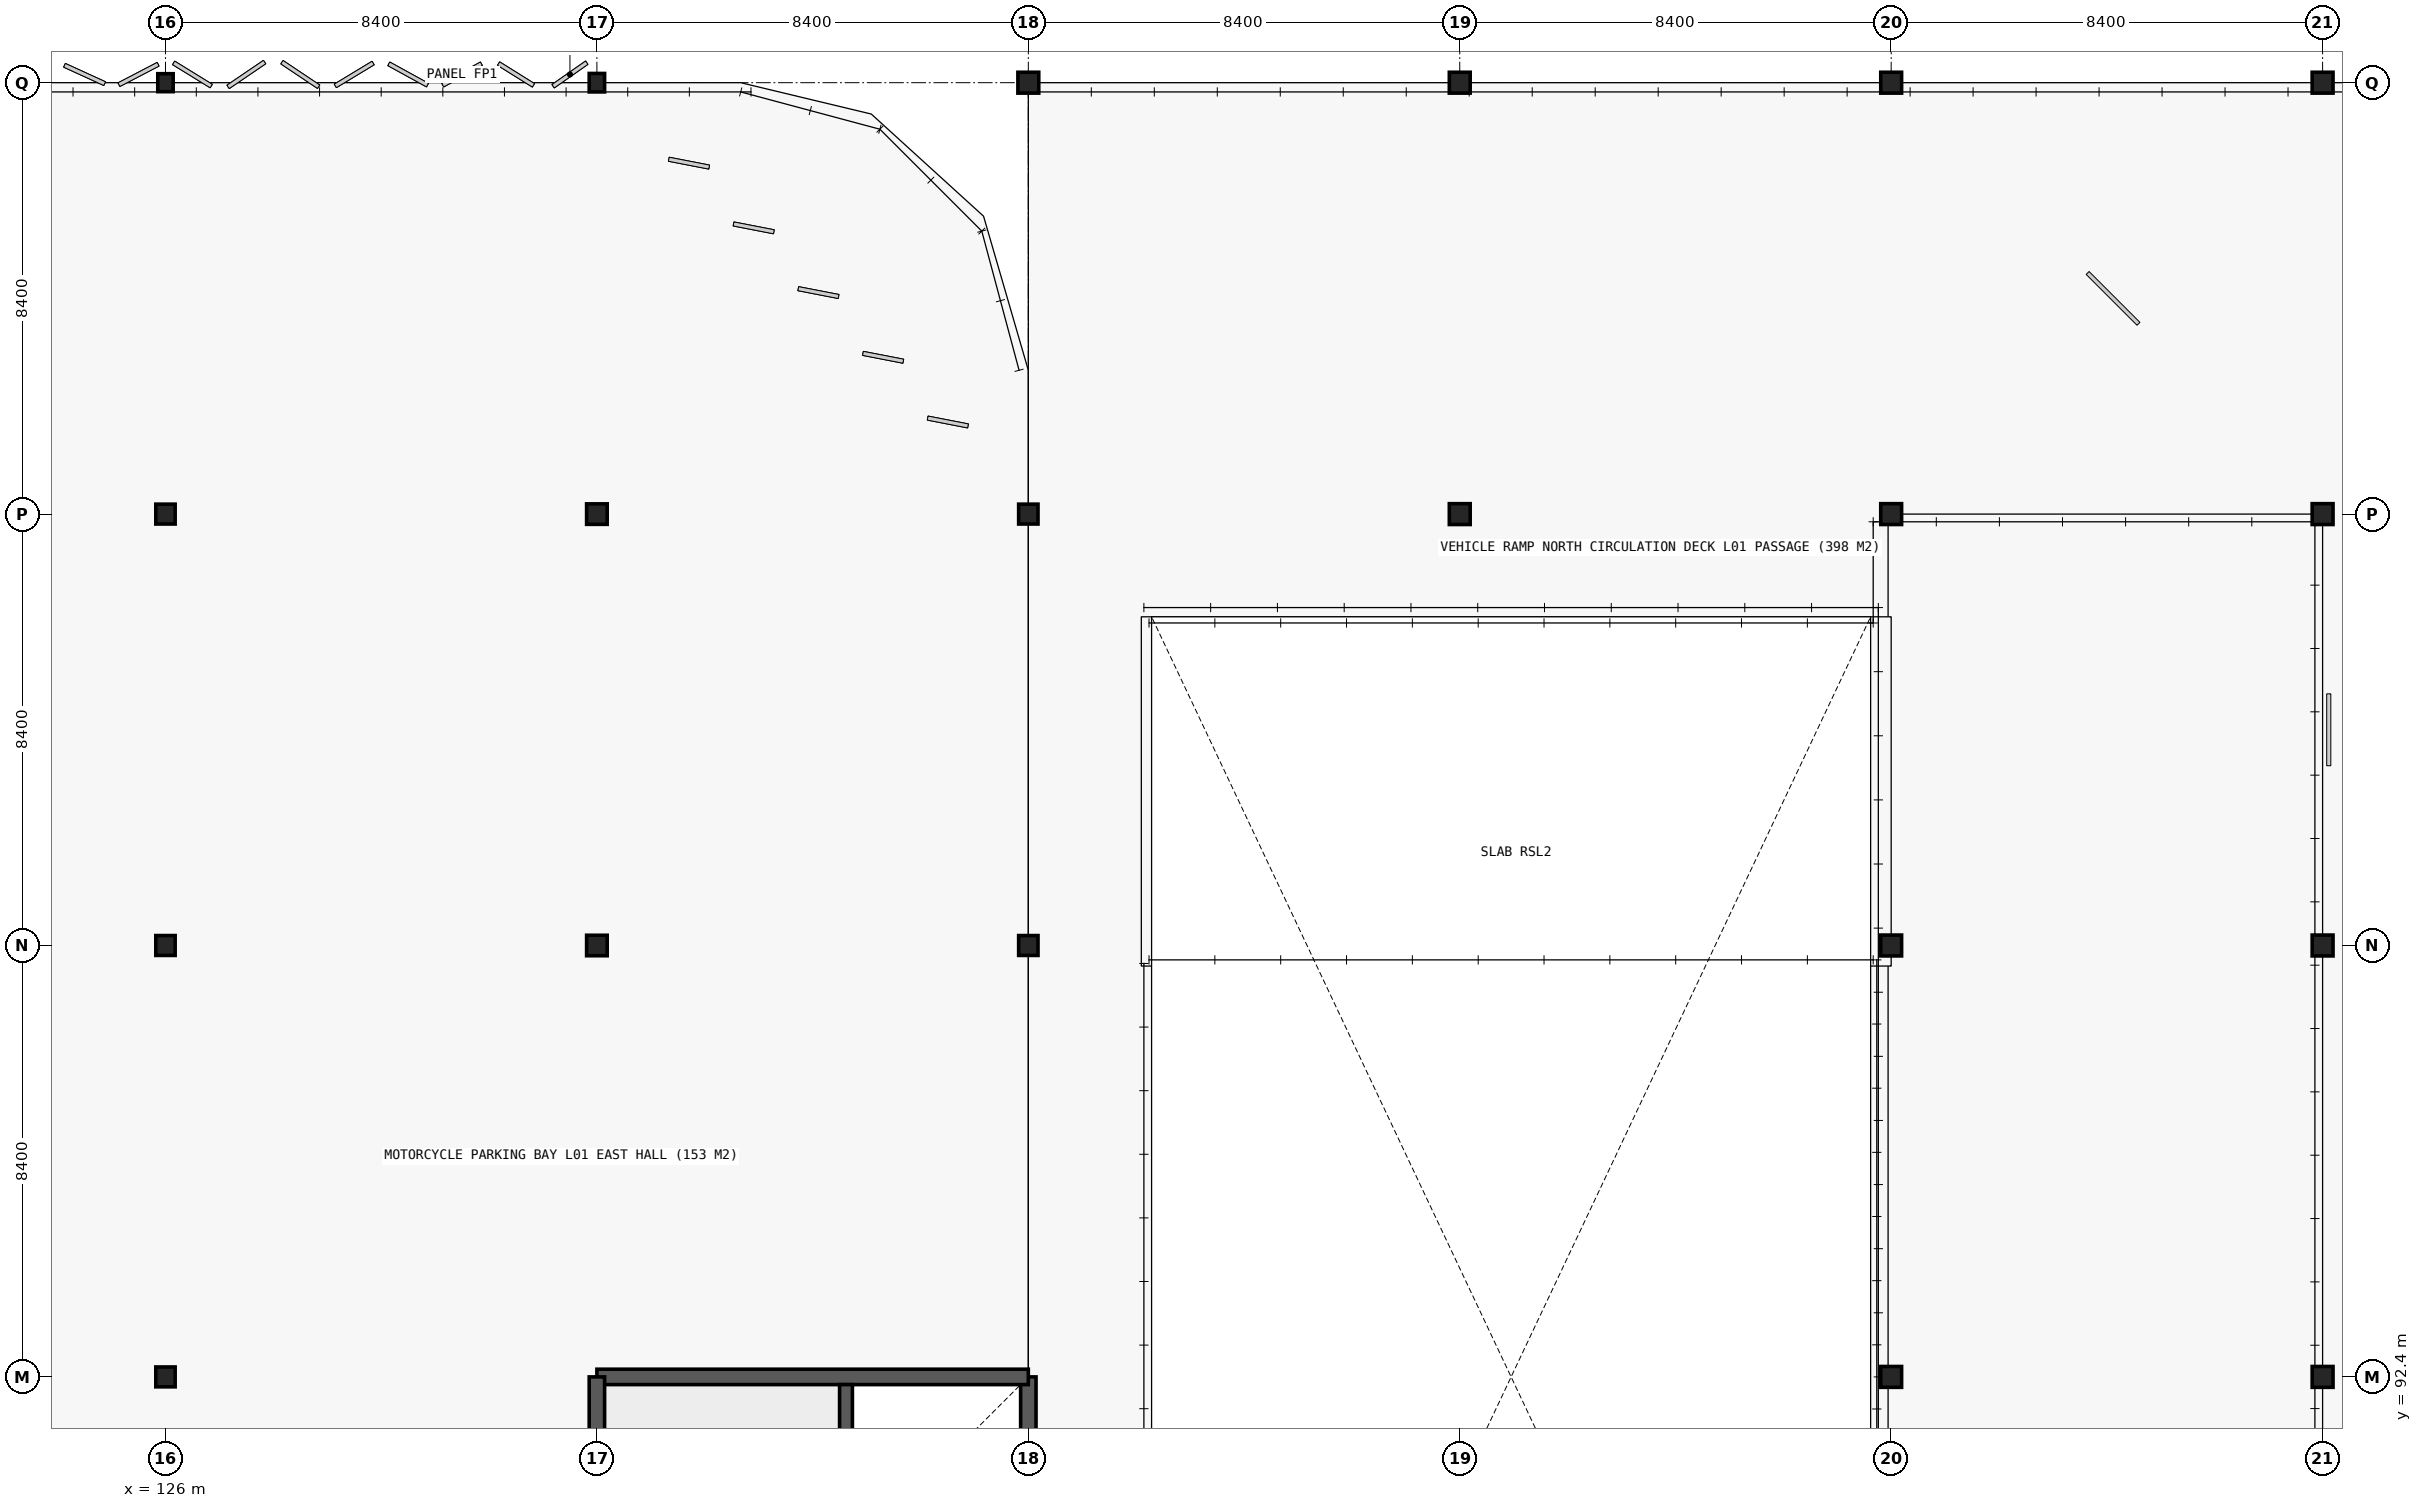
"""IFC4 building model, lengths in metres.
Left out: names, types, materials, properties, quantities, classifications, styles, units other than length and angle.
Written with IfcOpenShell. Run it as: python <this file> out.ifc"""

import sys

from ifc_helpers import new_model, si_unit, direction, frame, frame_2d, origin, origin_2d, place, context, subcontext, project, spatial, rectangle, hollow_circle, i_section, extrude, element, save


model = new_model("IFC4")
c1 = context("Model", 3, precision=1e-05, world=origin(), true_north=direction((0.0, 1.0)))
c2 = subcontext(c1, "Body", "Model", "MODEL_VIEW")
j1 = project(units=[si_unit("LENGTHUNIT", "METRE"), si_unit("PLANEANGLEUNIT", "RADIAN")], contexts=[c1])
p1 = place(None, origin())
s1 = spatial("IfcSite", under=j1, at=p1, CompositionType="ELEMENT")
p2 = place(p1, origin())
s2 = spatial("IfcBuilding", under=s1, at=p2, CompositionType="ELEMENT")
p3 = place(p2, frame((0.0, 0.0, 4.8)))
s3 = spatial("IfcBuildingStorey", under=s2, at=p3, CompositionType="ELEMENT", Elevation=4.8)
p4 = place(p3, frame((142.8, 84.0, 0.0), z_axis=(0.0, 0.0, 1.0), x_axis=(0.0, 1.0, 0.0)))
e1 = element("IfcWall", 1, at=p4, inside=s3, PredefinedType="SHEAR", context=c2, shape_type="SweptSolid", body=[
    extrude(rectangle(XDim=8.4, YDim=0.3, at=frame_2d((4.2, 0.0))), origin(), (0.0, 0.0, 1.0), 4.2),
])
p5 = place(p3, frame((142.8, 92.4, 0.0), z_axis=(0.0, 0.0, 1.0), x_axis=(-1.0, 0.0, 0.0)))
e2 = element("IfcWall", 2, at=p5, inside=s3, PredefinedType="SHEAR", context=c2, shape_type="SweptSolid", body=[
    extrude(rectangle(XDim=8.4, YDim=0.3, at=frame_2d((4.2, 0.0))), origin(), (0.0, 0.0, 1.0), 4.2),
])
p6 = place(p3, frame((134.4, 92.4, 0.0), z_axis=(0.0, 0.0, 1.0), x_axis=(0.0, -1.0, 0.0)))
e3 = element("IfcWall", 3, at=p6, inside=s3, PredefinedType="SHEAR", context=c2, shape_type="SweptSolid", body=[
    extrude(rectangle(XDim=8.4, YDim=0.3, at=frame_2d((4.2, 0.0))), origin(), (0.0, 0.0, 1.0), 4.2),
])
p7 = place(p3, frame((139.25, 84.15, 0.0), z_axis=(0.0, 0.0, 1.0), x_axis=(0.0, 1.0, 0.0)))
e4 = element("IfcWall", 4, at=p7, inside=s3, PredefinedType="SHEAR", context=c2, shape_type="SweptSolid", body=[
    extrude(rectangle(XDim=8.1, YDim=0.25, at=frame_2d((4.05, 0.0))), origin(), (0.0, 0.0, 1.0), 4.2),
])
for number, where, z_axis, x_axis in (
    (5, (126.0, 92.4, 0.0), (0.0, 0.0, 1.0), (1.0, 0.0, 0.0)),
    (6, (126.0, 100.8, 0.0), (0.0, 0.0, 1.0), (1.0, 0.0, 0.0)),
    (7, (126.0, 109.2, 0.0), (0.0, 0.0, 1.0), (1.0, 0.0, 0.0)),
):
    element("IfcColumn", number, at=place(p3, frame(where, z_axis=z_axis, x_axis=x_axis)), inside=s3, PredefinedType="COLUMN", context=c2, shape_type="SweptSolid", body=[
        extrude(i_section(OverallWidth=0.377, OverallDepth=0.387, WebThickness=0.022, FlangeThickness=0.036, FilletRadius=0.015, at=origin_2d()), origin(), (0.0, 0.0, 1.0), 4.2),
    ])
p8 = place(p3, frame((126.0, 117.6, 0.0), z_axis=(0.0, 0.0, 1.0), x_axis=(1.0, 0.0, 0.0)))
e8 = element("IfcColumn", 8, at=p8, inside=s3, PredefinedType="COLUMN", context=c2, shape_type="SweptSolid", body=[
    extrude(i_section(OverallWidth=0.3, OverallDepth=0.35, WebThickness=0.01, FlangeThickness=0.018, FilletRadius=0.027, at=origin_2d()), origin(), (0.0, 0.0, 1.0), 4.2),
])
for number, where, z_axis, x_axis in (
    (9, (134.4, 100.8, 0.0), (0.0, 0.0, 1.0), (1.0, 0.0, 0.0)),
    (10, (134.4, 109.2, 0.0), (0.0, 0.0, 1.0), (1.0, 0.0, 0.0)),
):
    element("IfcColumn", number, at=place(p3, frame(where, z_axis=z_axis, x_axis=x_axis)), inside=s3, PredefinedType="COLUMN", context=c2, shape_type="SweptSolid", body=[
        extrude(i_section(OverallWidth=0.401, OverallDepth=0.399, WebThickness=0.025, FlangeThickness=0.04, FilletRadius=0.015, at=origin_2d()), origin(), (0.0, 0.0, 1.0), 4.2),
    ])
p9 = place(p3, frame((134.4, 117.6, 0.0), z_axis=(0.0, 0.0, 1.0), x_axis=(1.0, 0.0, 0.0)))
e11 = element("IfcColumn", 11, at=p9, inside=s3, PredefinedType="COLUMN", context=c2, shape_type="SweptSolid", body=[
    extrude(i_section(OverallWidth=0.3, OverallDepth=0.36, WebThickness=0.012, FlangeThickness=0.022, FilletRadius=0.027, at=origin_2d()), origin(), (0.0, 0.0, 1.0), 4.2),
])
for number, where, z_axis, x_axis in (
    (12, (142.8, 100.8, 0.0), (0.0, 0.0, 1.0), (1.0, 0.0, 0.0)),
    (13, (142.8, 109.2, 0.0), (0.0, 0.0, 1.0), (1.0, 0.0, 0.0)),
):
    element("IfcColumn", number, at=place(p3, frame(where, z_axis=z_axis, x_axis=x_axis)), inside=s3, PredefinedType="COLUMN", context=c2, shape_type="SweptSolid", body=[
        extrude(i_section(OverallWidth=0.377, OverallDepth=0.387, WebThickness=0.022, FlangeThickness=0.036, FilletRadius=0.015, at=origin_2d()), origin(), (0.0, 0.0, 1.0), 4.2),
    ])
for number, where, z_axis, x_axis in (
    (14, (142.8, 117.6, 0.0), (0.0, 0.0, 1.0), (1.0, 0.0, 0.0)),
    (15, (151.2, 109.2, 0.0), (0.0, 0.0, 1.0), (1.0, 0.0, 0.0)),
    (16, (151.2, 117.6, 0.0), (0.0, 0.0, 1.0), (1.0, 0.0, 0.0)),
    (17, (159.6, 92.4, 0.0), (0.0, 0.0, 1.0), (1.0, 0.0, 0.0)),
    (18, (159.6, 100.8, 0.0), (0.0, 0.0, 1.0), (1.0, 0.0, 0.0)),
    (19, (159.6, 109.2, 0.0), (0.0, 0.0, 1.0), (1.0, 0.0, 0.0)),
    (20, (159.6, 117.6, 0.0), (0.0, 0.0, 1.0), (1.0, 0.0, 0.0)),
    (21, (168.0, 92.4, 0.0), (0.0, 0.0, 1.0), (1.0, 0.0, 0.0)),
    (22, (168.0, 100.8, 0.0), (0.0, 0.0, 1.0), (1.0, 0.0, 0.0)),
    (23, (168.0, 109.2, 0.0), (0.0, 0.0, 1.0), (1.0, 0.0, 0.0)),
    (24, (168.0, 117.6, 0.0), (0.0, 0.0, 1.0), (1.0, 0.0, 0.0)),
):
    element("IfcColumn", number, at=place(p3, frame(where, z_axis=z_axis, x_axis=x_axis)), inside=s3, PredefinedType="COLUMN", context=c2, shape_type="SweptSolid", body=[
        extrude(hollow_circle(Radius=0.203, WallThickness=0.012, at=origin_2d()), origin(), (0.0, 0.0, 1.0), 4.2),
    ])
save(model, sys.argv[1])
